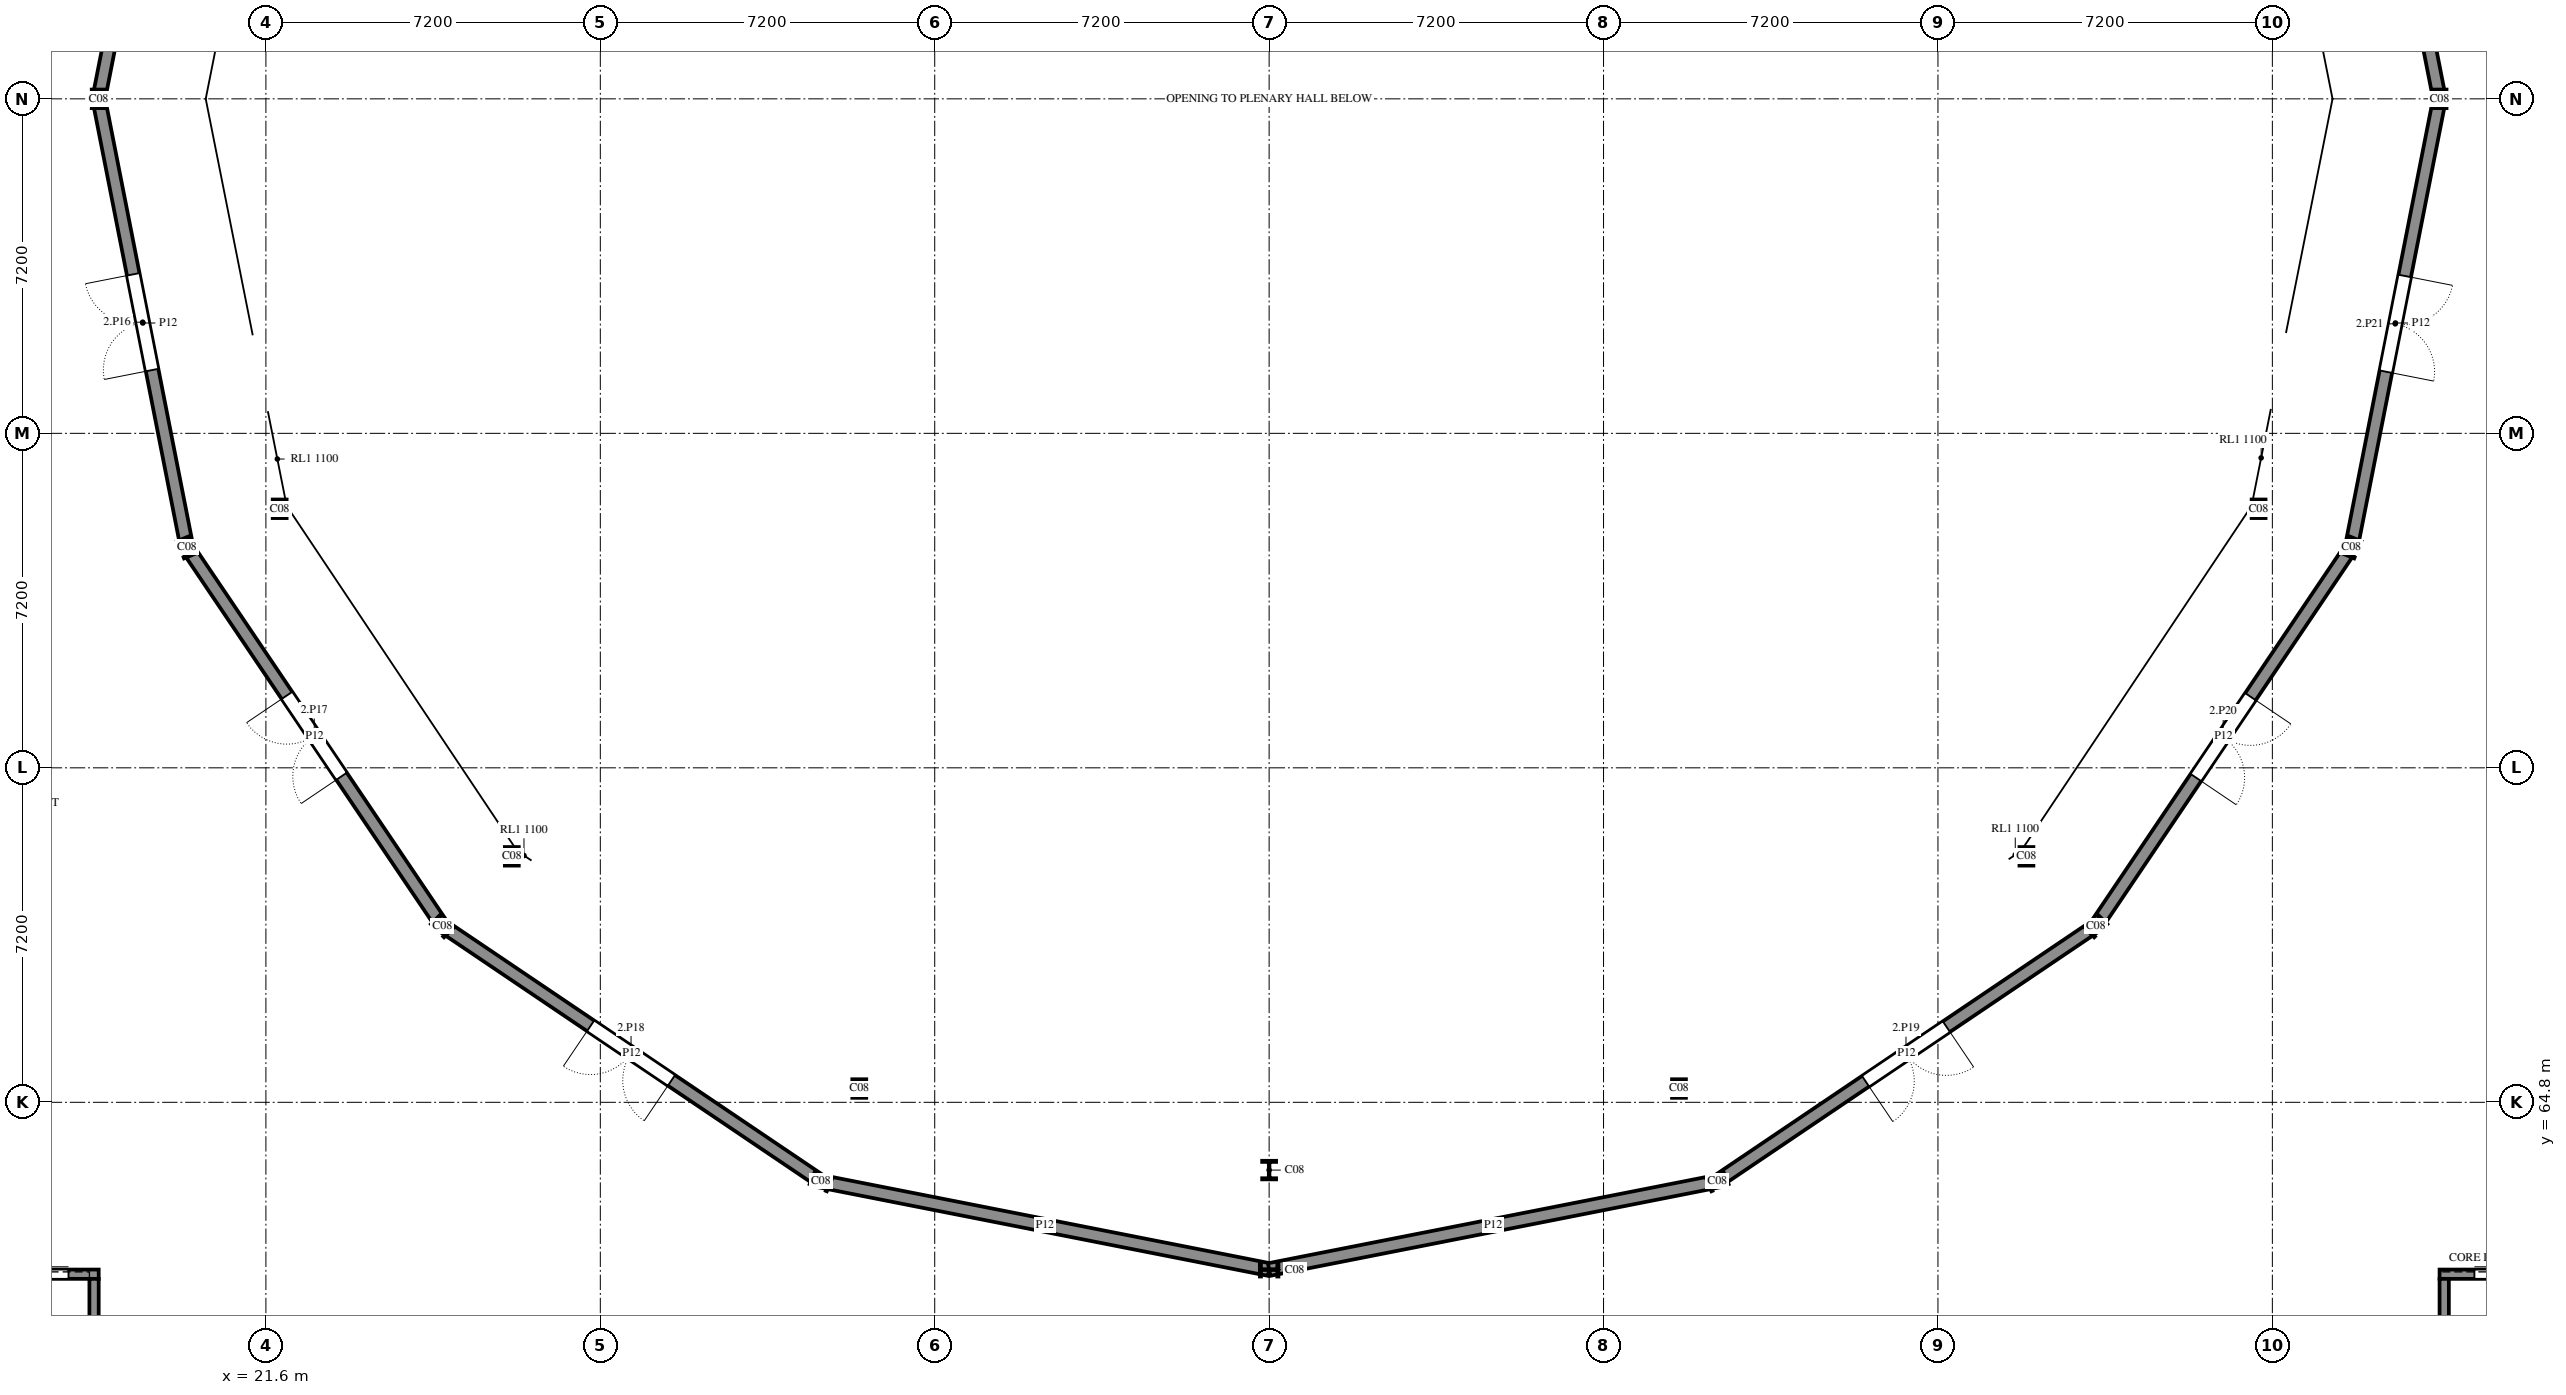
"""IFC4 building model, lengths in metres.
Left out: names, types, materials, properties, quantities, classifications, styles, units other than length and angle.
Written with IfcOpenShell. Run it as: python <this file> out.ifc"""

import sys

from ifc_helpers import new_model, si_unit, direction, frame, frame_2d, origin, origin_2d, place, context, subcontext, project, spatial, rectangle, i_section, extrude, element, fill, save


model = new_model("IFC4")
c1 = context("Model", 3, precision=1e-05, world=origin(), true_north=direction((0.0, 1.0)))
c2 = subcontext(c1, "Body", "Model", "MODEL_VIEW")
j1 = project(units=[si_unit("LENGTHUNIT", "METRE"), si_unit("PLANEANGLEUNIT", "RADIAN")], contexts=[c1])
p1 = place(None, origin())
s1 = spatial("IfcSite", under=j1, at=p1, CompositionType="ELEMENT")
p2 = place(p1, origin())
s2 = spatial("IfcBuilding", under=s1, at=p2, CompositionType="ELEMENT")
p3 = place(p2, frame((0.0, 0.0, 7.2)))
s3 = spatial("IfcBuildingStorey", under=s2, at=p3, CompositionType="ELEMENT", Elevation=7.2)
for number, where, z_axis, x_axis in (
    (1, (68.4, 86.4, 0.0), (0.0, 0.0, 1.0), (1.0, 0.0, 0.0)),
    (2, (18.0, 86.4, 0.0), (0.0, 0.0, 1.0), (-1.0, 0.0, 0.0)),
    (3, (19.9, 76.75, 0.0), (0.0, 0.0, 1.0), (-0.924, -0.383, 0.0)),
    (4, (25.4, 68.6, 0.0), (0.0, 0.0, 1.0), (-0.707, -0.707, 0.0)),
    (5, (33.55, 63.1, 0.0), (0.0, 0.0, 1.0), (-0.383, -0.924, 0.0)),
    (6, (43.2, 61.2, 0.0), (0.0, 0.0, 1.0), (0.0, -1.0, 0.0)),
    (7, (52.85, 63.1, 0.0), (0.0, 0.0, 1.0), (0.383, -0.924, 0.0)),
    (8, (61.0, 68.6, 0.0), (0.0, 0.0, 1.0), (0.707, -0.707, 0.0)),
    (9, (66.5, 76.75, 0.0), (0.0, 0.0, 1.0), (0.924, -0.383, 0.0)),
):
    element("IfcColumn", number, at=place(p3, frame(where, z_axis=z_axis, x_axis=x_axis)), inside=s3, PredefinedType="COLUMN", context=c2, shape_type="SweptSolid", body=[
        extrude(i_section(OverallWidth=0.3, OverallDepth=0.4, WebThickness=0.013, FlangeThickness=0.024, FilletRadius=0.027, at=origin_2d()), origin(), (0.0, 0.0, 1.0), 3.6),
    ])
p4 = place(p3, frame((15.6, 61.1, 0.0), z_axis=(0.0, 0.0, 1.0), x_axis=(1.0, 0.0, 0.0)))
e10 = element("IfcWall", 10, at=p4, inside=s3, PredefinedType="SHEAR", context=c2, shape_type="SweptSolid", body=[
    extrude(rectangle(XDim=2.4, YDim=0.2, at=frame_2d((1.2, 0.0))), origin(), (0.0, 0.0, 1.0), 3.6),
])
p5 = place(p4, frame((0.65, 0.0, 0.0)))
e11 = element("IfcOpeningElement", 11, at=p5, cuts=e10, PredefinedType="OPENING", context=c2, shape_type="SweptSolid", body=[
    extrude(rectangle(XDim=1.1, YDim=2.1, at=frame_2d((0.55, 1.05))), frame((0.0, 0.11, 0.0), z_axis=(0.0, -1.0, 0.0), x_axis=(1.0, 0.0, 0.0)), (0.0, 0.0, 1.0), 0.22),
])
p6 = place(p3, frame((17.9, 58.8, 0.0), z_axis=(0.0, 0.0, 1.0), x_axis=(0.0, 1.0, 0.0)))
e12 = element("IfcWall", 12, at=p6, inside=s3, PredefinedType="SHEAR", context=c2, shape_type="SweptSolid", body=[
    extrude(rectangle(XDim=2.2, YDim=0.2, at=frame_2d((1.1, 0.0))), origin(), (0.0, 0.0, 1.0), 3.6),
])
p7 = place(p3, frame((68.4, 61.1, 0.0), z_axis=(0.0, 0.0, 1.0), x_axis=(1.0, 0.0, 0.0)))
e13 = element("IfcWall", 13, at=p7, inside=s3, PredefinedType="SHEAR", context=c2, shape_type="SweptSolid", body=[
    extrude(rectangle(XDim=2.6, YDim=0.2, at=frame_2d((1.3, 0.0))), origin(), (0.0, 0.0, 1.0), 3.6),
])
p8 = place(p7, frame((0.75, 0.0, 0.0)))
e14 = element("IfcOpeningElement", 14, at=p8, cuts=e13, PredefinedType="OPENING", context=c2, shape_type="SweptSolid", body=[
    extrude(rectangle(XDim=1.1, YDim=2.1, at=frame_2d((0.55, 1.05))), frame((0.0, 0.11, 0.0), z_axis=(0.0, -1.0, 0.0), x_axis=(1.0, 0.0, 0.0)), (0.0, 0.0, 1.0), 0.22),
])
p9 = place(p3, frame((68.5, 58.8, 0.0), z_axis=(0.0, 0.0, 1.0), x_axis=(0.0, 1.0, 0.0)))
e15 = element("IfcWall", 15, at=p9, inside=s3, PredefinedType="SHEAR", context=c2, shape_type="SweptSolid", body=[
    extrude(rectangle(XDim=2.2, YDim=0.2, at=frame_2d((1.1, 0.0))), origin(), (0.0, 0.0, 1.0), 3.6),
])
p10 = place(p3, frame((18.0, 86.4, 0.0), z_axis=(0.0, 0.0, 1.0), x_axis=(0.193174651092, -0.981164386928, 0.0)))
e16 = element("IfcWall", 16, at=p10, inside=s3, PredefinedType="PARTITIONING", context=c2, shape_type="SweptSolid", body=[
    extrude(rectangle(XDim=9.835, YDim=0.275, at=frame_2d((4.917, 0.0))), origin(), (0.0, 0.0, 1.0), 3.07),
])
p11 = place(p10, frame((3.85, 0.0, 0.0)))
e17 = element("IfcOpeningElement", 17, at=p11, cuts=e16, PredefinedType="OPENING", context=c2, shape_type="SweptSolid", body=[
    extrude(rectangle(XDim=2.1, YDim=2.4, at=frame_2d((1.05, 1.2))), frame((0.0, 0.147, 0.0), z_axis=(0.0, -1.0, 0.0), x_axis=(1.0, 0.0, 0.0)), (0.0, 0.0, 1.0), 0.295),
])
p12 = place(p3, frame((19.9, 76.75, 0.0), z_axis=(0.0, 0.0, 1.0), x_axis=(0.559390118145, -0.828904515443, 0.0)))
e18 = element("IfcWall", 18, at=p12, inside=s3, PredefinedType="PARTITIONING", context=c2, shape_type="SweptSolid", body=[
    extrude(rectangle(XDim=9.832, YDim=0.275, at=frame_2d((4.916, 0.0))), origin(), (0.0, 0.0, 1.0), 3.07),
])
p13 = place(p12, frame((3.85, 0.0, 0.0)))
e19 = element("IfcOpeningElement", 19, at=p13, cuts=e18, PredefinedType="OPENING", context=c2, shape_type="SweptSolid", body=[
    extrude(rectangle(XDim=2.1, YDim=2.4, at=frame_2d((1.05, 1.2))), frame((0.0, 0.147, 0.0), z_axis=(0.0, -1.0, 0.0), x_axis=(1.0, 0.0, 0.0)), (0.0, 0.0, 1.0), 0.295),
])
p14 = place(p3, frame((25.4, 68.6, 0.0), z_axis=(0.0, 0.0, 1.0), x_axis=(0.828912285216, -0.559378604719, 0.0)))
e20 = element("IfcWall", 20, at=p14, inside=s3, PredefinedType="PARTITIONING", context=c2, shape_type="SweptSolid", body=[
    extrude(rectangle(XDim=9.832, YDim=0.275, at=frame_2d((4.916, 0.0))), origin(), (0.0, 0.0, 1.0), 3.07),
])
p15 = place(p14, frame((3.85, 0.0, 0.0)))
e21 = element("IfcOpeningElement", 21, at=p15, cuts=e20, PredefinedType="OPENING", context=c2, shape_type="SweptSolid", body=[
    extrude(rectangle(XDim=2.1, YDim=2.4, at=frame_2d((1.05, 1.2))), frame((0.0, 0.147, 0.0), z_axis=(0.0, -1.0, 0.0), x_axis=(1.0, 0.0, 0.0)), (0.0, 0.0, 1.0), 0.295),
])
p16 = place(p3, frame((33.55, 63.1, 0.0), z_axis=(0.0, 0.0, 1.0), x_axis=(0.981159681755, -0.19319854787, 0.0)))
e22 = element("IfcWall", 22, at=p16, inside=s3, PredefinedType="PARTITIONING", context=c2, shape_type="SweptSolid", body=[
    extrude(rectangle(XDim=9.835, YDim=0.275, at=frame_2d((4.917, 0.0))), origin(), (0.0, 0.0, 1.0), 3.07),
])
p17 = place(p3, frame((43.2, 61.2, 0.0), z_axis=(0.0, 0.0, 1.0), x_axis=(0.981160608262, 0.193193842541, 0.0)))
e23 = element("IfcWall", 23, at=p17, inside=s3, PredefinedType="PARTITIONING", context=c2, shape_type="SweptSolid", body=[
    extrude(rectangle(XDim=9.835, YDim=0.275, at=frame_2d((4.918, 0.0))), origin(), (0.0, 0.0, 1.0), 3.07),
])
p18 = place(p3, frame((52.85, 63.1, 0.0), z_axis=(0.0, 0.0, 1.0), x_axis=(0.828904515443, 0.559390118145, 0.0)))
e24 = element("IfcWall", 24, at=p18, inside=s3, PredefinedType="PARTITIONING", context=c2, shape_type="SweptSolid", body=[
    extrude(rectangle(XDim=9.832, YDim=0.275, at=frame_2d((4.916, 0.0))), origin(), (0.0, 0.0, 1.0), 3.07),
])
p19 = place(p18, frame((3.85, 0.0, 0.0)))
e25 = element("IfcOpeningElement", 25, at=p19, cuts=e24, PredefinedType="OPENING", context=c2, shape_type="SweptSolid", body=[
    extrude(rectangle(XDim=2.1, YDim=2.4, at=frame_2d((1.05, 1.2))), frame((0.0, 0.147, 0.0), z_axis=(0.0, -1.0, 0.0), x_axis=(1.0, 0.0, 0.0)), (0.0, 0.0, 1.0), 0.295),
])
p20 = place(p3, frame((61.0, 68.6, 0.0), z_axis=(0.0, 0.0, 1.0), x_axis=(0.559390118145, 0.828904515443, 0.0)))
e26 = element("IfcWall", 26, at=p20, inside=s3, PredefinedType="PARTITIONING", context=c2, shape_type="SweptSolid", body=[
    extrude(rectangle(XDim=9.832, YDim=0.275, at=frame_2d((4.916, 0.0))), origin(), (0.0, 0.0, 1.0), 3.07),
])
p21 = place(p20, frame((3.85, 0.0, 0.0)))
e27 = element("IfcOpeningElement", 27, at=p21, cuts=e26, PredefinedType="OPENING", context=c2, shape_type="SweptSolid", body=[
    extrude(rectangle(XDim=2.1, YDim=2.4, at=frame_2d((1.05, 1.2))), frame((0.0, 0.147, 0.0), z_axis=(0.0, -1.0, 0.0), x_axis=(1.0, 0.0, 0.0)), (0.0, 0.0, 1.0), 0.295),
])
p22 = place(p3, frame((66.5, 76.75, 0.0), z_axis=(0.0, 0.0, 1.0), x_axis=(0.193174651092, 0.981164386928, 0.0)))
e28 = element("IfcWall", 28, at=p22, inside=s3, PredefinedType="PARTITIONING", context=c2, shape_type="SweptSolid", body=[
    extrude(rectangle(XDim=9.835, YDim=0.275, at=frame_2d((4.917, 0.0))), origin(), (0.0, 0.0, 1.0), 3.07),
])
p23 = place(p22, frame((3.85, 0.0, 0.0)))
e29 = element("IfcOpeningElement", 29, at=p23, cuts=e28, PredefinedType="OPENING", context=c2, shape_type="SweptSolid", body=[
    extrude(rectangle(XDim=2.1, YDim=2.4, at=frame_2d((1.05, 1.2))), frame((0.0, 0.147, 0.0), z_axis=(0.0, -1.0, 0.0), x_axis=(1.0, 0.0, 0.0)), (0.0, 0.0, 1.0), 0.295),
])
p24 = place(p3, frame((19.9, 96.05, 0.0), z_axis=(0.0, 0.0, 1.0), x_axis=(-0.1931699463, -0.98116531321, 0.0)))
e30 = element("IfcWall", 30, at=p24, inside=s3, PredefinedType="PARTITIONING", context=c2, shape_type="SweptSolid", body=[
    extrude(rectangle(XDim=9.835, YDim=0.275, at=frame_2d((4.918, 0.0))), origin(), (0.0, 0.0, 1.0), 3.07),
])
p25 = place(p24, frame((3.85, 0.0, 0.0)))
e31 = element("IfcOpeningElement", 31, at=p25, cuts=e30, PredefinedType="OPENING", context=c2, shape_type="SweptSolid", body=[
    extrude(rectangle(XDim=2.1, YDim=2.4, at=frame_2d((1.05, 1.2))), frame((0.0, 0.147, 0.0), z_axis=(0.0, -1.0, 0.0), x_axis=(1.0, 0.0, 0.0)), (0.0, 0.0, 1.0), 0.295),
])
p26 = place(p3, frame((68.4, 86.4, 0.0), z_axis=(0.0, 0.0, 1.0), x_axis=(-0.1931699463, 0.98116531321, 0.0)))
e32 = element("IfcWall", 32, at=p26, inside=s3, PredefinedType="PARTITIONING", context=c2, shape_type="SweptSolid", body=[
    extrude(rectangle(XDim=9.835, YDim=0.275, at=frame_2d((4.918, 0.0))), origin(), (0.0, 0.0, 1.0), 3.07),
])
p27 = place(p26, frame((3.85, 0.0, 0.0)))
e33 = element("IfcOpeningElement", 33, at=p27, cuts=e32, PredefinedType="OPENING", context=c2, shape_type="SweptSolid", body=[
    extrude(rectangle(XDim=2.1, YDim=2.4, at=frame_2d((1.05, 1.2))), frame((0.0, 0.147, 0.0), z_axis=(0.0, -1.0, 0.0), x_axis=(1.0, 0.0, 0.0)), (0.0, 0.0, 1.0), 0.295),
])
for number, where, z_axis, x_axis in (
    (34, (21.896, 77.576, 0.0), (0.0, 0.0, 1.0), (1.0, 0.0, 0.0)),
    (35, (26.895, 70.095, 0.0), (0.0, 0.0, 1.0), (1.0, 0.0, 0.0)),
    (36, (34.376, 65.096, 0.0), (0.0, 0.0, 1.0), (1.0, 0.0, 0.0)),
    (37, (43.2, 63.341, 0.0), (0.0, 0.0, 1.0), (1.0, 0.0, 0.0)),
    (38, (52.024, 65.096, 0.0), (0.0, 0.0, 1.0), (1.0, 0.0, 0.0)),
    (39, (59.505, 70.095, 0.0), (0.0, 0.0, 1.0), (1.0, 0.0, 0.0)),
    (40, (64.504, 77.576, 0.0), (0.0, 0.0, 1.0), (1.0, 0.0, 0.0)),
):
    element("IfcColumn", number, at=place(p3, frame(where, z_axis=z_axis, x_axis=x_axis)), inside=s3, PredefinedType="COLUMN", context=c2, shape_type="SweptSolid", body=[
        extrude(i_section(OverallWidth=0.3, OverallDepth=0.4, WebThickness=0.013, FlangeThickness=0.024, FilletRadius=0.027, at=origin_2d()), origin(), (0.0, 0.0, 1.0), 3.6),
    ])
p28 = place(p5, origin())
e41 = element("IfcDoor", 41, at=p28, inside=s3, OperationType="SLIDING_TO_LEFT", PredefinedType="DOOR", context=c2, shape_type="SweptSolid", body=[
    extrude(rectangle(XDim=1.1, YDim=2.1, at=frame_2d((0.55, 1.05))), frame((0.0, 0.025, 0.0), z_axis=(0.0, -1.0, 0.0), x_axis=(1.0, 0.0, 0.0)), (0.0, 0.0, 1.0), 0.05),
])
fill(e11, e41)
p29 = place(p8, origin())
e42 = element("IfcDoor", 42, at=p29, inside=s3, OperationType="SLIDING_TO_LEFT", PredefinedType="DOOR", context=c2, shape_type="SweptSolid", body=[
    extrude(rectangle(XDim=1.1, YDim=2.1, at=frame_2d((0.55, 1.05))), frame((0.0, 0.025, 0.0), z_axis=(0.0, -1.0, 0.0), x_axis=(1.0, 0.0, 0.0)), (0.0, 0.0, 1.0), 0.05),
])
fill(e14, e42)
p30 = place(p11, frame((2.1, 0.0, 0.0), z_axis=(0.0, 0.0, 1.0), x_axis=(-1.0, 0.0, 0.0)))
e43 = element("IfcDoor", 43, at=p30, inside=s3, OperationType="DOUBLE_DOOR_SINGLE_SWING", PredefinedType="DOOR", context=c2, shape_type="SweptSolid", body=[
    extrude(rectangle(XDim=2.1, YDim=2.4, at=frame_2d((1.05, 1.2))), frame((0.0, 0.025, 0.0), z_axis=(0.0, -1.0, 0.0), x_axis=(1.0, 0.0, 0.0)), (0.0, 0.0, 1.0), 0.05),
])
fill(e17, e43)
p31 = place(p13, frame((2.1, 0.0, 0.0), z_axis=(0.0, 0.0, 1.0), x_axis=(-1.0, 0.0, 0.0)))
e44 = element("IfcDoor", 44, at=p31, inside=s3, OperationType="DOUBLE_DOOR_SINGLE_SWING", PredefinedType="DOOR", context=c2, shape_type="SweptSolid", body=[
    extrude(rectangle(XDim=2.1, YDim=2.4, at=frame_2d((1.05, 1.2))), frame((0.0, 0.025, 0.0), z_axis=(0.0, -1.0, 0.0), x_axis=(1.0, 0.0, 0.0)), (0.0, 0.0, 1.0), 0.05),
])
fill(e19, e44)
p32 = place(p15, frame((2.1, 0.0, 0.0), z_axis=(0.0, 0.0, 1.0), x_axis=(-1.0, 0.0, 0.0)))
e45 = element("IfcDoor", 45, at=p32, inside=s3, OperationType="DOUBLE_DOOR_SINGLE_SWING", PredefinedType="DOOR", context=c2, shape_type="SweptSolid", body=[
    extrude(rectangle(XDim=2.1, YDim=2.4, at=frame_2d((1.05, 1.2))), frame((0.0, 0.025, 0.0), z_axis=(0.0, -1.0, 0.0), x_axis=(1.0, 0.0, 0.0)), (0.0, 0.0, 1.0), 0.05),
])
fill(e21, e45)
p33 = place(p19, frame((2.1, 0.0, 0.0), z_axis=(0.0, 0.0, 1.0), x_axis=(-1.0, 0.0, 0.0)))
e46 = element("IfcDoor", 46, at=p33, inside=s3, OperationType="DOUBLE_DOOR_SINGLE_SWING", PredefinedType="DOOR", context=c2, shape_type="SweptSolid", body=[
    extrude(rectangle(XDim=2.1, YDim=2.4, at=frame_2d((1.05, 1.2))), frame((0.0, 0.025, 0.0), z_axis=(0.0, -1.0, 0.0), x_axis=(1.0, 0.0, 0.0)), (0.0, 0.0, 1.0), 0.05),
])
fill(e25, e46)
p34 = place(p21, frame((2.1, 0.0, 0.0), z_axis=(0.0, 0.0, 1.0), x_axis=(-1.0, 0.0, 0.0)))
e47 = element("IfcDoor", 47, at=p34, inside=s3, OperationType="DOUBLE_DOOR_SINGLE_SWING", PredefinedType="DOOR", context=c2, shape_type="SweptSolid", body=[
    extrude(rectangle(XDim=2.1, YDim=2.4, at=frame_2d((1.05, 1.2))), frame((0.0, 0.025, 0.0), z_axis=(0.0, -1.0, 0.0), x_axis=(1.0, 0.0, 0.0)), (0.0, 0.0, 1.0), 0.05),
])
fill(e27, e47)
p35 = place(p23, frame((2.1, 0.0, 0.0), z_axis=(0.0, 0.0, 1.0), x_axis=(-1.0, 0.0, 0.0)))
e48 = element("IfcDoor", 48, at=p35, inside=s3, OperationType="DOUBLE_DOOR_SINGLE_SWING", PredefinedType="DOOR", context=c2, shape_type="SweptSolid", body=[
    extrude(rectangle(XDim=2.1, YDim=2.4, at=frame_2d((1.05, 1.2))), frame((0.0, 0.025, 0.0), z_axis=(0.0, -1.0, 0.0), x_axis=(1.0, 0.0, 0.0)), (0.0, 0.0, 1.0), 0.05),
])
fill(e29, e48)
save(model, sys.argv[1])
